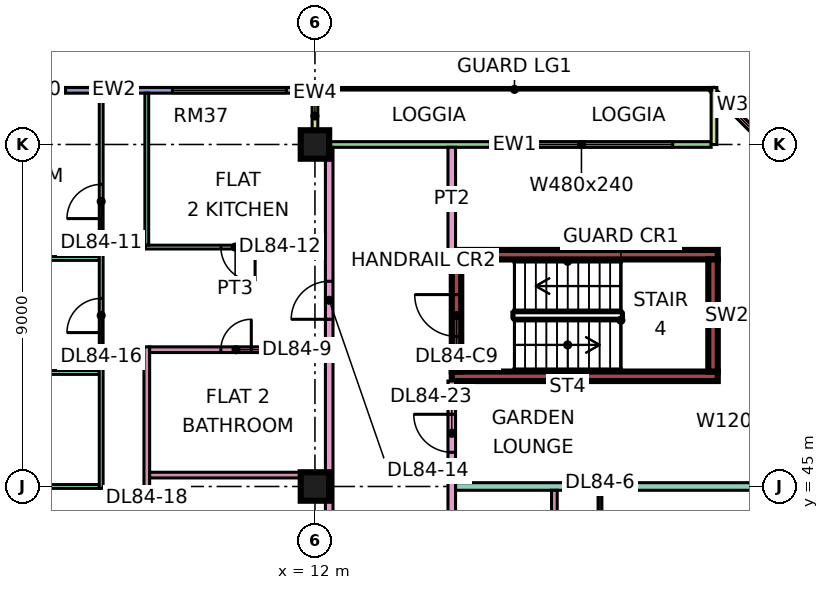
"""IFC4 building model, lengths in metres.
Left out: names, types, materials, properties, quantities, classifications, styles, units other than length and angle.
Written with IfcOpenShell. Run it as: python <this file> out.ifc"""

import sys

from ifc_helpers import new_model, si_unit, direction, frame, frame_2d, origin, origin_2d, place, context, subcontext, project, spatial, rectangle, extrude, element, fill, save


model = new_model("IFC4")
c1 = context("Model", 3, precision=1e-05, world=origin(), true_north=direction((0.0, 1.0)))
c2 = subcontext(c1, "Body", "Model", "MODEL_VIEW")
j1 = project(units=[si_unit("LENGTHUNIT", "METRE"), si_unit("PLANEANGLEUNIT", "RADIAN")], contexts=[c1])
p1 = place(None, origin())
s1 = spatial("IfcSite", under=j1, at=p1, CompositionType="ELEMENT")
p2 = place(p1, origin())
s2 = spatial("IfcBuilding", under=s1, at=p2, CompositionType="ELEMENT")
p3 = place(p2, frame((0.0, 0.0, 361.4)))
s3 = spatial("IfcBuildingStorey", under=s2, at=p3, CompositionType="ELEMENT", Elevation=361.4)
for number, where, z_axis, x_axis in (
    (1, (12.0, 45.0, 0.0), (0.0, 0.0, 1.0), (1.0, 0.0, 0.0)),
    (2, (12.0, 54.0, 0.0), (0.0, 0.0, 1.0), (1.0, 0.0, 0.0)),
):
    element("IfcColumn", number, at=place(p3, frame(where, z_axis=z_axis, x_axis=x_axis)), inside=s3, PredefinedType="COLUMN", context=c2, shape_type="SweptSolid", body=[
        extrude(rectangle(XDim=0.75, YDim=0.75, at=origin_2d()), origin(), (0.0, 0.0, 1.0), 3.75),
    ])
for number, where, z_axis, x_axis in (
    (3, (15.6, 47.9, 0.0), (0.0, 0.0, 1.0), (1.0, 0.0, 0.0)),
    (4, (15.6, 51.1, 0.0), (0.0, 0.0, 1.0), (1.0, 0.0, 0.0)),
):
    element("IfcWall", number, at=place(p3, frame(where, z_axis=z_axis, x_axis=x_axis)), inside=s3, PredefinedType="SHEAR", context=c2, shape_type="SweptSolid", body=[
        extrude(rectangle(XDim=7.0, YDim=0.25, at=frame_2d((3.5, 0.0))), origin(), (0.0, 0.0, 1.0), 3.75),
    ])
p4 = place(p3, frame((15.725, 48.025, 0.0), z_axis=(0.0, 0.0, 1.0), x_axis=(0.0, 1.0, 0.0)))
e5 = element("IfcWall", 5, at=p4, inside=s3, PredefinedType="SHEAR", context=c2, shape_type="SweptSolid", body=[
    extrude(rectangle(XDim=2.95, YDim=0.25, at=frame_2d((1.475, 0.0))), origin(), (0.0, 0.0, 1.0), 3.75),
])
p5 = place(p4, frame((0.925, 0.0, 0.0)))
e6 = element("IfcOpeningElement", 6, at=p5, cuts=e5, PredefinedType="OPENING", context=c2, shape_type="SweptSolid", body=[
    extrude(rectangle(XDim=1.1, YDim=2.2, at=frame_2d((0.55, 1.1))), frame((0.0, 0.135, 0.0), z_axis=(0.0, -1.0, 0.0), x_axis=(1.0, 0.0, 0.0)), (0.0, 0.0, 1.0), 0.27),
])
p6 = place(p3, frame((22.475, 48.025, 0.0), z_axis=(0.0, 0.0, 1.0), x_axis=(0.0, 1.0, 0.0)))
e7 = element("IfcWall", 7, at=p6, inside=s3, PredefinedType="SHEAR", context=c2, shape_type="SweptSolid", body=[
    extrude(rectangle(XDim=2.95, YDim=0.25, at=frame_2d((1.475, 0.0))), origin(), (0.0, 0.0, 1.0), 3.75),
])
p7 = place(p3, frame((25.447, 52.447, 0.0), z_axis=(0.0, 0.0, 1.0), x_axis=(-0.707106781187, 0.707106781187, 0.0)))
e8 = element("IfcWall", 8, at=p7, inside=s3, PredefinedType="SOLIDWALL", context=c2, shape_type="SweptSolid", body=[
    extrude(rectangle(XDim=4.243, YDim=0.15, at=frame_2d((2.121, 0.0))), origin(), (0.0, 0.0, 1.0), 3.35),
])
p8 = place(p7, frame((0.621, 0.0, 0.45)))
e9 = element("IfcOpeningElement", 9, at=p8, cuts=e8, PredefinedType="OPENING", context=c2, shape_type="SweptSolid", body=[
    extrude(rectangle(XDim=3.0, YDim=2.4, at=frame_2d((1.5, 1.2))), frame((0.0, 0.085, 0.0), z_axis=(0.0, -1.0, 0.0), x_axis=(1.0, 0.0, 0.0)), (0.0, 0.0, 1.0), 0.17),
])
p9 = place(p3, frame((22.425, 54.0, 0.0), z_axis=(0.0, 0.0, 1.0), x_axis=(-1.0, 0.0, 0.0)))
e10 = element("IfcWall", 10, at=p9, inside=s3, PredefinedType="SOLIDWALL", context=c2, shape_type="SweptSolid", body=[
    extrude(rectangle(XDim=10.35, YDim=0.15, at=frame_2d((5.175, 0.0))), origin(), (0.0, 0.0, 1.0), 3.35),
])
p10 = place(p9, frame((1.012, 0.0, 0.45)))
e11 = element("IfcOpeningElement", 11, at=p10, cuts=e10, PredefinedType="OPENING", context=c2, shape_type="SweptSolid", body=[
    extrude(rectangle(XDim=4.8, YDim=2.4, at=frame_2d((2.4, 1.2))), frame((0.0, 0.085, 0.0), z_axis=(0.0, -1.0, 0.0), x_axis=(1.0, 0.0, 0.0)), (0.0, 0.0, 1.0), 0.17),
])
for number, where, z_axis, x_axis in (
    (12, (22.5, 55.5, 0.0), (0.0, 0.0, 1.0), (0.0, -1.0, 0.0)),
    (13, (12.0, 55.5, 0.0), (0.0, 0.0, 1.0), (0.0, -1.0, 0.0)),
):
    element("IfcWall", number, at=place(p3, frame(where, z_axis=z_axis, x_axis=x_axis)), inside=s3, PredefinedType="SOLIDWALL", context=c2, shape_type="SweptSolid", body=[
        extrude(rectangle(XDim=1.5, YDim=0.15, at=frame_2d((0.75, 0.0))), origin(), (0.0, 0.0, 1.0), 3.35),
    ])
p11 = place(p3, frame((11.925, 55.425, 0.0), z_axis=(0.0, 0.0, 1.0), x_axis=(-1.0, 0.0, 0.0)))
e14 = element("IfcWall", 14, at=p11, inside=s3, PredefinedType="SOLIDWALL", context=c2, shape_type="SweptSolid", body=[
    extrude(rectangle(XDim=10.425, YDim=0.15, at=frame_2d((5.212, 0.0))), origin(), (0.0, 0.0, 1.0), 3.35),
])
p12 = place(p11, frame((0.675, 0.0, 0.45)))
e15 = element("IfcOpeningElement", 15, at=p12, cuts=e14, PredefinedType="OPENING", context=c2, shape_type="SweptSolid", body=[
    extrude(rectangle(XDim=3.0, YDim=2.4, at=frame_2d((1.5, 1.2))), frame((0.0, 0.085, 0.0), z_axis=(0.0, -1.0, 0.0), x_axis=(1.0, 0.0, 0.0)), (0.0, 0.0, 1.0), 0.17),
])
p13 = place(p11, frame((6.488, 0.0, 0.45)))
e16 = element("IfcOpeningElement", 16, at=p13, cuts=e14, PredefinedType="OPENING", context=c2, shape_type="SweptSolid", body=[
    extrude(rectangle(XDim=3.0, YDim=2.4, at=frame_2d((1.5, 1.2))), frame((0.0, 0.085, 0.0), z_axis=(0.0, -1.0, 0.0), x_axis=(1.0, 0.0, 0.0)), (0.0, 0.0, 1.0), 0.17),
])
p14 = place(p3, frame((0.0, 48.0, 0.0), z_axis=(0.0, 0.0, 1.0), x_axis=(1.0, 0.0, 0.0)))
e17 = element("IfcWall", 17, at=p14, inside=s3, PredefinedType="PARTITIONING", context=c2, shape_type="SweptSolid", body=[
    extrude(rectangle(XDim=6.325, YDim=0.1, at=frame_2d((3.163, 0.0))), origin(), (0.0, 0.0, 1.0), 3.35),
])
p15 = place(p3, frame((-1.35, 51.0, 0.0), z_axis=(0.0, 0.0, 1.0), x_axis=(1.0, 0.0, 0.0)))
e18 = element("IfcWall", 18, at=p15, inside=s3, PredefinedType="PARTITIONING", context=c2, shape_type="SweptSolid", body=[
    extrude(rectangle(XDim=7.675, YDim=0.1, at=frame_2d((3.837, 0.0))), origin(), (0.0, 0.0, 1.0), 3.35),
])
p16 = place(p3, frame((0.074, 45.0, 0.0), z_axis=(0.0, 0.0, 1.0), x_axis=(1.0, 0.0, 0.0)))
e19 = element("IfcWall", 19, at=p16, inside=s3, PredefinedType="PARTITIONING", context=c2, shape_type="SweptSolid", body=[
    extrude(rectangle(XDim=6.251, YDim=0.1, at=frame_2d((3.125, 0.0))), origin(), (0.0, 0.0, 1.0), 3.35),
])
p17 = place(p16, frame((2.301, 0.0, 0.0)))
e20 = element("IfcOpeningElement", 20, at=p17, cuts=e19, PredefinedType="OPENING", context=c2, shape_type="SweptSolid", body=[
    extrude(rectangle(XDim=1.6, YDim=2.1, at=frame_2d((0.8, 1.05))), frame((0.0, 0.06, 0.0), z_axis=(0.0, -1.0, 0.0), x_axis=(1.0, 0.0, 0.0)), (0.0, 0.0, 1.0), 0.12),
])
p18 = place(p3, frame((6.375, 44.95, 0.0), z_axis=(0.0, 0.0, 1.0), x_axis=(0.0, 1.0, 0.0)))
e21 = element("IfcWall", 21, at=p18, inside=s3, PredefinedType="PARTITIONING", context=c2, shape_type="SweptSolid", body=[
    extrude(rectangle(XDim=10.4, YDim=0.1, at=frame_2d((5.2, 0.0))), origin(), (0.0, 0.0, 1.0), 3.35),
])
p19 = place(p18, frame((7.1, 0.0, 0.0)))
e22 = element("IfcOpeningElement", 22, at=p19, cuts=e21, PredefinedType="OPENING", context=c2, shape_type="SweptSolid", body=[
    extrude(rectangle(XDim=0.9, YDim=2.1, at=frame_2d((0.45, 1.05))), frame((0.0, 0.06, 0.0), z_axis=(0.0, -1.0, 0.0), x_axis=(1.0, 0.0, 0.0)), (0.0, 0.0, 1.0), 0.12),
])
p20 = place(p18, frame((4.1, 0.0, 0.0)))
e23 = element("IfcOpeningElement", 23, at=p20, cuts=e21, PredefinedType="OPENING", context=c2, shape_type="SweptSolid", body=[
    extrude(rectangle(XDim=0.9, YDim=2.1, at=frame_2d((0.45, 1.05))), frame((0.0, 0.06, 0.0), z_axis=(0.0, -1.0, 0.0), x_axis=(1.0, 0.0, 0.0)), (0.0, 0.0, 1.0), 0.12),
])
p21 = place(p3, frame((7.525, 51.3, 0.0), z_axis=(0.0, 0.0, 1.0), x_axis=(1.0, 0.0, 0.0)))
e24 = element("IfcWall", 24, at=p21, inside=s3, PredefinedType="PARTITIONING", context=c2, shape_type="SweptSolid", body=[
    extrude(rectangle(XDim=4.75, YDim=0.1, at=frame_2d((2.375, 0.0))), origin(), (0.0, 0.0, 1.0), 3.35),
])
p22 = place(p21, frame((2.0, 0.0, 0.0)))
e25 = element("IfcOpeningElement", 25, at=p22, cuts=e24, PredefinedType="OPENING", context=c2, shape_type="SweptSolid", body=[
    extrude(rectangle(XDim=0.9, YDim=2.1, at=frame_2d((0.45, 1.05))), frame((0.0, 0.06, 0.0), z_axis=(0.0, -1.0, 0.0), x_axis=(1.0, 0.0, 0.0)), (0.0, 0.0, 1.0), 0.12),
])
p23 = place(p3, frame((7.575, 36.1, 0.0), z_axis=(0.0, 0.0, 1.0), x_axis=(0.0, 1.0, 0.0)))
e26 = element("IfcWall", 26, at=p23, inside=s3, PredefinedType="PARTITIONING", context=c2, shape_type="SweptSolid", body=[
    extrude(rectangle(XDim=12.575, YDim=0.15, at=frame_2d((6.288, 0.0))), origin(), (0.0, 0.0, 1.0), 3.35),
])
p24 = place(p23, frame((0.65, 0.0, 0.0)))
e27 = element("IfcOpeningElement", 27, at=p24, cuts=e26, PredefinedType="OPENING", context=c2, shape_type="SweptSolid", body=[
    extrude(rectangle(XDim=0.8, YDim=2.1, at=frame_2d((0.4, 1.05))), frame((0.0, 0.085, 0.0), z_axis=(0.0, -1.0, 0.0), x_axis=(1.0, 0.0, 0.0)), (0.0, 0.0, 1.0), 0.17),
])
p25 = place(p23, frame((3.65, 0.0, 0.0)))
e28 = element("IfcOpeningElement", 28, at=p25, cuts=e26, PredefinedType="OPENING", context=c2, shape_type="SweptSolid", body=[
    extrude(rectangle(XDim=0.8, YDim=2.1, at=frame_2d((0.4, 1.05))), frame((0.0, 0.085, 0.0), z_axis=(0.0, -1.0, 0.0), x_axis=(1.0, 0.0, 0.0)), (0.0, 0.0, 1.0), 0.17),
])
p26 = place(p23, frame((7.1, 0.0, 0.0)))
e29 = element("IfcOpeningElement", 29, at=p26, cuts=e26, PredefinedType="OPENING", context=c2, shape_type="SweptSolid", body=[
    extrude(rectangle(XDim=0.8, YDim=2.1, at=frame_2d((0.4, 1.05))), frame((0.0, 0.085, 0.0), z_axis=(0.0, -1.0, 0.0), x_axis=(1.0, 0.0, 0.0)), (0.0, 0.0, 1.0), 0.17),
])
p27 = place(p3, frame((7.575, 51.35, 0.0), z_axis=(0.0, 0.0, 1.0), x_axis=(0.0, 1.0, 0.0)))
e30 = element("IfcWall", 30, at=p27, inside=s3, PredefinedType="PARTITIONING", context=c2, shape_type="SweptSolid", body=[
    extrude(rectangle(XDim=4.0, YDim=0.1, at=frame_2d((2.0, 0.0))), origin(), (0.0, 0.0, 1.0), 3.35),
])
p28 = place(p3, frame((7.65, 45.3, 0.0), z_axis=(0.0, 0.0, 1.0), x_axis=(1.0, 0.0, 0.0)))
e31 = element("IfcWall", 31, at=p28, inside=s3, PredefinedType="PARTITIONING", context=c2, shape_type="SweptSolid", body=[
    extrude(rectangle(XDim=4.625, YDim=0.15, at=frame_2d((2.312, 0.0))), origin(), (0.0, 0.0, 1.0), 3.35),
])
p29 = place(p3, frame((7.65, 48.6, 0.0), z_axis=(0.0, 0.0, 1.0), x_axis=(1.0, 0.0, 0.0)))
e32 = element("IfcWall", 32, at=p29, inside=s3, PredefinedType="PARTITIONING", context=c2, shape_type="SweptSolid", body=[
    extrude(rectangle(XDim=4.625, YDim=0.15, at=frame_2d((2.312, 0.0))), origin(), (0.0, 0.0, 1.0), 3.35),
])
p30 = place(p29, frame((1.875, 0.0, 0.0)))
e33 = element("IfcOpeningElement", 33, at=p30, cuts=e32, PredefinedType="OPENING", context=c2, shape_type="SweptSolid", body=[
    extrude(rectangle(XDim=0.8, YDim=2.1, at=frame_2d((0.4, 1.05))), frame((0.0, 0.085, 0.0), z_axis=(0.0, -1.0, 0.0), x_axis=(1.0, 0.0, 0.0)), (0.0, 0.0, 1.0), 0.17),
])
p31 = place(p3, frame((12.375, 20.0, 0.0), z_axis=(0.0, 0.0, 1.0), x_axis=(0.0, 1.0, 0.0)))
e34 = element("IfcWall", 34, at=p31, inside=s3, PredefinedType="PARTITIONING", context=c2, shape_type="SweptSolid", body=[
    extrude(rectangle(XDim=33.926, YDim=0.2, at=frame_2d((16.963, 0.0))), origin(), (0.0, 0.0, 1.0), 3.35),
])
p32 = place(p31, frame((29.4, 0.0, 0.0)))
e35 = element("IfcOpeningElement", 35, at=p32, cuts=e34, PredefinedType="OPENING", context=c2, shape_type="SweptSolid", body=[
    extrude(rectangle(XDim=1.0, YDim=2.1, at=frame_2d((0.5, 1.05))), frame((0.0, 0.11, 0.0), z_axis=(0.0, -1.0, 0.0), x_axis=(1.0, 0.0, 0.0)), (0.0, 0.0, 1.0), 0.22),
])
p33 = place(p31, frame((0.6, 0.0, 0.0)))
e36 = element("IfcOpeningElement", 36, at=p33, cuts=e34, PredefinedType="OPENING", context=c2, shape_type="SweptSolid", body=[
    extrude(rectangle(XDim=1.2, YDim=2.1, at=frame_2d((0.6, 1.05))), frame((0.0, 0.11, 0.0), z_axis=(0.0, -1.0, 0.0), x_axis=(1.0, 0.0, 0.0)), (0.0, 0.0, 1.0), 0.22),
])
p34 = place(p31, frame((4.5, 0.0, 0.0)))
e37 = element("IfcOpeningElement", 37, at=p34, cuts=e34, PredefinedType="OPENING", context=c2, shape_type="SweptSolid", body=[
    extrude(rectangle(XDim=1.0, YDim=2.1, at=frame_2d((0.5, 1.05))), frame((0.0, 0.11, 0.0), z_axis=(0.0, -1.0, 0.0), x_axis=(1.0, 0.0, 0.0)), (0.0, 0.0, 1.0), 0.22),
])
p35 = place(p3, frame((15.6, 20.0, 0.0), z_axis=(0.0, 0.0, 1.0), x_axis=(0.0, 1.0, 0.0)))
e38 = element("IfcWall", 38, at=p35, inside=s3, PredefinedType="PARTITIONING", context=c2, shape_type="SweptSolid", body=[
    extrude(rectangle(XDim=27.775, YDim=0.2, at=frame_2d((13.887, 0.0))), origin(), (0.0, 0.0, 1.0), 3.35),
])
p36 = place(p35, frame((7.15, 0.0, 0.0)))
e39 = element("IfcOpeningElement", 39, at=p36, cuts=e38, PredefinedType="OPENING", context=c2, shape_type="SweptSolid", body=[
    extrude(rectangle(XDim=1.6, YDim=2.1, at=frame_2d((0.8, 1.05))), frame((0.0, 0.11, 0.0), z_axis=(0.0, -1.0, 0.0), x_axis=(1.0, 0.0, 0.0)), (0.0, 0.0, 1.0), 0.22),
])
p37 = place(p35, frame((13.5, 0.0, 0.0)))
e40 = element("IfcOpeningElement", 40, at=p37, cuts=e38, PredefinedType="OPENING", context=c2, shape_type="SweptSolid", body=[
    extrude(rectangle(XDim=1.0, YDim=2.1, at=frame_2d((0.5, 1.05))), frame((0.0, 0.11, 0.0), z_axis=(0.0, -1.0, 0.0), x_axis=(1.0, 0.0, 0.0)), (0.0, 0.0, 1.0), 0.22),
])
p38 = place(p35, frame((17.05, 0.0, 0.0)))
e41 = element("IfcOpeningElement", 41, at=p38, cuts=e38, PredefinedType="OPENING", context=c2, shape_type="SweptSolid", body=[
    extrude(rectangle(XDim=1.0, YDim=2.1, at=frame_2d((0.5, 1.05))), frame((0.0, 0.11, 0.0), z_axis=(0.0, -1.0, 0.0), x_axis=(1.0, 0.0, 0.0)), (0.0, 0.0, 1.0), 0.22),
])
p39 = place(p35, frame((1.15, 0.0, 0.0)))
e42 = element("IfcOpeningElement", 42, at=p39, cuts=e38, PredefinedType="OPENING", context=c2, shape_type="SweptSolid", body=[
    extrude(rectangle(XDim=1.8, YDim=2.1, at=frame_2d((0.9, 1.05))), frame((0.0, 0.11, 0.0), z_axis=(0.0, -1.0, 0.0), x_axis=(1.0, 0.0, 0.0)), (0.0, 0.0, 1.0), 0.22),
])
p40 = place(p35, frame((25.9, 0.0, 0.0)))
e43 = element("IfcOpeningElement", 43, at=p40, cuts=e38, PredefinedType="OPENING", context=c2, shape_type="SweptSolid", body=[
    extrude(rectangle(XDim=1.0, YDim=2.1, at=frame_2d((0.5, 1.05))), frame((0.0, 0.11, 0.0), z_axis=(0.0, -1.0, 0.0), x_axis=(1.0, 0.0, 0.0)), (0.0, 0.0, 1.0), 0.22),
])
p41 = place(p3, frame((15.6, 51.225, 0.0), z_axis=(0.0, 0.0, 1.0), x_axis=(0.0, 1.0, 0.0)))
e44 = element("IfcWall", 44, at=p41, inside=s3, PredefinedType="PARTITIONING", context=c2, shape_type="SweptSolid", body=[
    extrude(rectangle(XDim=2.701, YDim=0.2, at=frame_2d((1.351, 0.0))), origin(), (0.0, 0.0, 1.0), 3.35),
])
p42 = place(p3, frame((15.7, 45.0, 0.0), z_axis=(0.0, 0.0, 1.0), x_axis=(1.0, 0.0, 0.0)))
e45 = element("IfcWall", 45, at=p42, inside=s3, PredefinedType="PARTITIONING", context=c2, shape_type="SweptSolid", body=[
    extrude(rectangle(XDim=8.226, YDim=0.2, at=frame_2d((4.113, 0.0))), origin(), (0.0, 0.0, 1.0), 3.35),
])
p43 = place(p3, frame((18.3, 38.925, 0.0), z_axis=(0.0, 0.0, 1.0), x_axis=(0.0, 1.0, 0.0)))
e46 = element("IfcWall", 46, at=p43, inside=s3, PredefinedType="PARTITIONING", context=c2, shape_type="SweptSolid", body=[
    extrude(rectangle(XDim=5.975, YDim=0.15, at=frame_2d((2.987, 0.0))), origin(), (0.0, 0.0, 1.0), 3.35),
])
p44 = place(p43, frame((4.425, 0.0, 0.0)))
e47 = element("IfcOpeningElement", 47, at=p44, cuts=e46, PredefinedType="OPENING", context=c2, shape_type="SweptSolid", body=[
    extrude(rectangle(XDim=0.9, YDim=2.1, at=frame_2d((0.45, 1.05))), frame((0.0, 0.085, 0.0), z_axis=(0.0, -1.0, 0.0), x_axis=(1.0, 0.0, 0.0)), (0.0, 0.0, 1.0), 0.17),
])
p45 = place(p3, frame((19.5, 42.05, 0.0), z_axis=(0.0, 0.0, 1.0), x_axis=(0.0, 1.0, 0.0)))
e48 = element("IfcWall", 48, at=p45, inside=s3, PredefinedType="PARTITIONING", context=c2, shape_type="SweptSolid", body=[
    extrude(rectangle(XDim=2.85, YDim=0.1, at=frame_2d((1.425, 0.0))), origin(), (0.0, 0.0, 1.0), 3.35),
])
p46 = place(p45, frame((1.0, 0.0, 0.0)))
e49 = element("IfcOpeningElement", 49, at=p46, cuts=e48, PredefinedType="OPENING", context=c2, shape_type="SweptSolid", body=[
    extrude(rectangle(XDim=0.9, YDim=2.1, at=frame_2d((0.45, 1.05))), frame((0.0, 0.06, 0.0), z_axis=(0.0, -1.0, 0.0), x_axis=(1.0, 0.0, 0.0)), (0.0, 0.0, 1.0), 0.12),
])
p47 = place(p8, origin())
e50 = element("IfcWindow", 50, at=p47, inside=s3, PartitioningType="SINGLE_PANEL", PredefinedType="WINDOW", context=c2, shape_type="SweptSolid", body=[
    extrude(rectangle(XDim=3.0, YDim=2.4, at=frame_2d((1.5, 1.2))), frame((0.0, 0.03, 0.0), z_axis=(0.0, -1.0, 0.0), x_axis=(1.0, 0.0, 0.0)), (0.0, 0.0, 1.0), 0.06),
])
fill(e9, e50)
p48 = place(p10, origin())
e51 = element("IfcWindow", 51, at=p48, inside=s3, PartitioningType="SINGLE_PANEL", PredefinedType="WINDOW", context=c2, shape_type="SweptSolid", body=[
    extrude(rectangle(XDim=4.8, YDim=2.4, at=frame_2d((2.4, 1.2))), frame((0.0, 0.03, 0.0), z_axis=(0.0, -1.0, 0.0), x_axis=(1.0, 0.0, 0.0)), (0.0, 0.0, 1.0), 0.06),
])
fill(e11, e51)
p49 = place(p12, origin())
e52 = element("IfcWindow", 52, at=p49, inside=s3, PartitioningType="SINGLE_PANEL", PredefinedType="WINDOW", context=c2, shape_type="SweptSolid", body=[
    extrude(rectangle(XDim=3.0, YDim=2.4, at=frame_2d((1.5, 1.2))), frame((0.0, 0.03, 0.0), z_axis=(0.0, -1.0, 0.0), x_axis=(1.0, 0.0, 0.0)), (0.0, 0.0, 1.0), 0.06),
])
fill(e15, e52)
p50 = place(p13, origin())
e53 = element("IfcWindow", 53, at=p50, inside=s3, PartitioningType="SINGLE_PANEL", PredefinedType="WINDOW", context=c2, shape_type="SweptSolid", body=[
    extrude(rectangle(XDim=3.0, YDim=2.4, at=frame_2d((1.5, 1.2))), frame((0.0, 0.03, 0.0), z_axis=(0.0, -1.0, 0.0), x_axis=(1.0, 0.0, 0.0)), (0.0, 0.0, 1.0), 0.06),
])
fill(e16, e53)
p51 = place(p5, frame((1.1, 0.0, 0.0), z_axis=(0.0, 0.0, 1.0), x_axis=(-1.0, 0.0, 0.0)))
e54 = element("IfcDoor", 54, at=p51, inside=s3, OperationType="SINGLE_SWING_RIGHT", PredefinedType="DOOR", context=c2, shape_type="SweptSolid", body=[
    extrude(rectangle(XDim=1.1, YDim=2.2, at=frame_2d((0.55, 1.1))), frame((0.0, 0.025, 0.0), z_axis=(0.0, -1.0, 0.0), x_axis=(1.0, 0.0, 0.0)), (0.0, 0.0, 1.0), 0.05),
])
fill(e6, e54)
p52 = place(p30, frame((0.8, 0.0, 0.0), z_axis=(0.0, 0.0, 1.0), x_axis=(-1.0, 0.0, 0.0)))
e55 = element("IfcDoor", 55, at=p52, inside=s3, OperationType="SINGLE_SWING_RIGHT", PredefinedType="DOOR", context=c2, shape_type="SweptSolid", body=[
    extrude(rectangle(XDim=0.8, YDim=2.1, at=frame_2d((0.4, 1.05))), frame((0.0, 0.025, 0.0), z_axis=(0.0, -1.0, 0.0), x_axis=(1.0, 0.0, 0.0)), (0.0, 0.0, 1.0), 0.05),
])
fill(e33, e55)
p53 = place(p19, origin())
e56 = element("IfcDoor", 56, at=p53, inside=s3, OperationType="SINGLE_SWING_LEFT", PredefinedType="DOOR", context=c2, shape_type="SweptSolid", body=[
    extrude(rectangle(XDim=0.9, YDim=2.1, at=frame_2d((0.45, 1.05))), frame((0.0, 0.025, 0.0), z_axis=(0.0, -1.0, 0.0), x_axis=(1.0, 0.0, 0.0)), (0.0, 0.0, 1.0), 0.05),
])
fill(e22, e56)
p54 = place(p22, origin())
e57 = element("IfcDoor", 57, at=p54, inside=s3, OperationType="SINGLE_SWING_RIGHT", PredefinedType="DOOR", context=c2, shape_type="SweptSolid", body=[
    extrude(rectangle(XDim=0.9, YDim=2.1, at=frame_2d((0.45, 1.05))), frame((0.0, 0.025, 0.0), z_axis=(0.0, -1.0, 0.0), x_axis=(1.0, 0.0, 0.0)), (0.0, 0.0, 1.0), 0.05),
])
fill(e25, e57)
p55 = place(p32, origin())
e58 = element("IfcDoor", 58, at=p55, inside=s3, OperationType="SINGLE_SWING_LEFT", PredefinedType="DOOR", context=c2, shape_type="SweptSolid", body=[
    extrude(rectangle(XDim=1.0, YDim=2.1, at=frame_2d((0.5, 1.05))), frame((0.0, 0.025, 0.0), z_axis=(0.0, -1.0, 0.0), x_axis=(1.0, 0.0, 0.0)), (0.0, 0.0, 1.0), 0.05),
])
fill(e35, e58)
p56 = place(p20, origin())
e59 = element("IfcDoor", 59, at=p56, inside=s3, OperationType="SINGLE_SWING_LEFT", PredefinedType="DOOR", context=c2, shape_type="SweptSolid", body=[
    extrude(rectangle(XDim=0.9, YDim=2.1, at=frame_2d((0.45, 1.05))), frame((0.0, 0.025, 0.0), z_axis=(0.0, -1.0, 0.0), x_axis=(1.0, 0.0, 0.0)), (0.0, 0.0, 1.0), 0.05),
])
fill(e23, e59)
p57 = place(p40, frame((1.0, 0.0, 0.0), z_axis=(0.0, 0.0, 1.0), x_axis=(-1.0, 0.0, 0.0)))
e60 = element("IfcDoor", 60, at=p57, inside=s3, OperationType="SINGLE_SWING_RIGHT", PredefinedType="DOOR", context=c2, shape_type="SweptSolid", body=[
    extrude(rectangle(XDim=1.0, YDim=2.1, at=frame_2d((0.5, 1.05))), frame((0.0, 0.025, 0.0), z_axis=(0.0, -1.0, 0.0), x_axis=(1.0, 0.0, 0.0)), (0.0, 0.0, 1.0), 0.05),
])
fill(e43, e60)
save(model, sys.argv[1])
